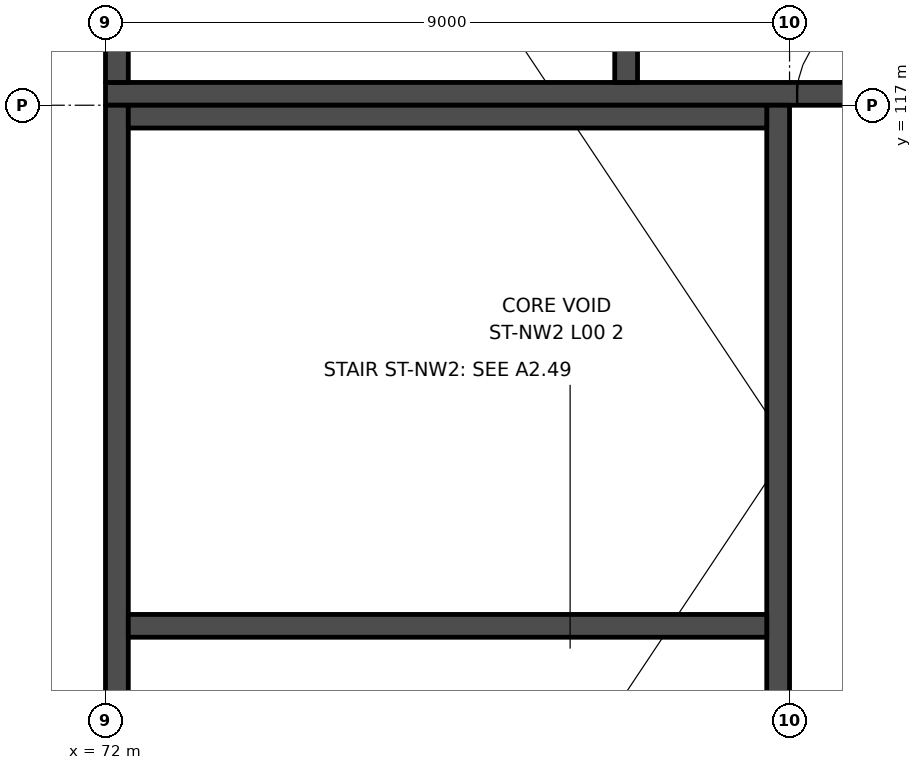
"""IFC4 building model, lengths in metres.
Left out: names, types, materials, properties, quantities, classifications, styles, units other than length and angle.
Written with IfcOpenShell. Run it as: python <this file> out.ifc"""

import sys

from ifc_helpers import new_model, si_unit, direction, frame, frame_2d, origin, place, context, subcontext, project, spatial, rectangle, extrude, element, fill, save


model = new_model("IFC4")
c1 = context("Model", 3, precision=1e-05, world=origin(), true_north=direction((0.0, 1.0)))
c2 = subcontext(c1, "Body", "Model", "MODEL_VIEW")
j1 = project(units=[si_unit("LENGTHUNIT", "METRE"), si_unit("PLANEANGLEUNIT", "RADIAN")], contexts=[c1])
p1 = place(None, origin())
s1 = spatial("IfcSite", under=j1, at=p1, CompositionType="ELEMENT")
p2 = place(p1, origin())
s2 = spatial("IfcBuilding", under=s1, at=p2, CompositionType="ELEMENT")
p3 = place(p2, origin())
s3 = spatial("IfcBuildingStorey", under=s2, at=p3, CompositionType="ELEMENT", Elevation=0.0)
p4 = place(p3, frame((90.25, 117.15, 0.0), z_axis=(0.0, 0.0, 1.0), x_axis=(-1.0, 0.0, 0.0)))
e1 = element("IfcWall", 1, at=p4, inside=s3, PredefinedType="SHEAR", context=c2, shape_type="SweptSolid", body=[
    extrude(rectangle(XDim=18.25, YDim=0.3, at=frame_2d((9.125, 0.0))), origin(), (0.0, 0.0, 1.0), 7.0),
])
p5 = place(p4, frame((8.15, 0.0, 0.0)))
e2 = element("IfcOpeningElement", 2, at=p5, cuts=e1, PredefinedType="OPENING", context=c2, shape_type="SweptSolid", body=[
    extrude(rectangle(XDim=1.0, YDim=2.1, at=frame_2d((0.5, 1.05))), frame((0.0, 0.16, 0.0), z_axis=(0.0, -1.0, 0.0), x_axis=(1.0, 0.0, 0.0)), (0.0, 0.0, 1.0), 0.32),
])
for number, where, z_axis, x_axis in (
    (3, (72.15, 117.3, 0.0), (0.0, 0.0, 1.0), (0.0, 1.0, 0.0)),
    (4, (78.85, 117.3, 0.0), (0.0, 0.0, 1.0), (0.0, 1.0, 0.0)),
):
    element("IfcWall", number, at=place(p3, frame(where, z_axis=z_axis, x_axis=x_axis)), inside=s3, PredefinedType="SHEAR", context=c2, shape_type="SweptSolid", body=[
        extrude(rectangle(XDim=8.4, YDim=0.3, at=frame_2d((4.2, 0.0))), origin(), (0.0, 0.0, 1.0), 7.0),
    ])
p6 = place(p3, frame((80.85, 99.0, 0.0), z_axis=(0.0, 0.0, 1.0), x_axis=(0.0, 1.0, 0.0)))
e5 = element("IfcWall", 5, at=p6, inside=s3, PredefinedType="SHEAR", context=c2, shape_type="SweptSolid", body=[
    extrude(rectangle(XDim=18.0, YDim=0.3, at=frame_2d((9.0, 0.0))), origin(), (0.0, 0.0, 1.0), 7.0),
])
p7 = place(p6, frame((8.6, 0.0, 0.0)))
e6 = element("IfcOpeningElement", 6, at=p7, cuts=e5, PredefinedType="OPENING", context=c2, shape_type="SweptSolid", body=[
    extrude(rectangle(XDim=1.2, YDim=2.1, at=frame_2d((0.6, 1.05))), frame((0.0, 0.16, 0.0), z_axis=(0.0, -1.0, 0.0), x_axis=(1.0, 0.0, 0.0)), (0.0, 0.0, 1.0), 0.32),
])
p8 = place(p3, frame((72.15, 99.0, 0.0), z_axis=(0.0, 0.0, 1.0), x_axis=(0.0, 1.0, 0.0)))
e7 = element("IfcWall", 7, at=p8, inside=s3, PredefinedType="SHEAR", context=c2, shape_type="SweptSolid", body=[
    extrude(rectangle(XDim=18.0, YDim=0.3, at=frame_2d((9.0, 0.0))), origin(), (0.0, 0.0, 1.0), 7.0),
])
for number, where, z_axis, x_axis in (
    (8, (80.7, 116.85, 0.0), (0.0, 0.0, 1.0), (-1.0, 0.0, 0.0)),
    (9, (80.7, 110.15, 0.0), (0.0, 0.0, 1.0), (-1.0, 0.0, 0.0)),
):
    element("IfcWall", number, at=place(p3, frame(where, z_axis=z_axis, x_axis=x_axis)), inside=s3, PredefinedType="SHEAR", context=c2, shape_type="SweptSolid", body=[
        extrude(rectangle(XDim=8.4, YDim=0.3, at=frame_2d((4.2, 0.0))), origin(), (0.0, 0.0, 1.0), 7.0),
    ])
p9 = place(p5, frame((1.0, 0.0, 0.0), z_axis=(0.0, 0.0, 1.0), x_axis=(-1.0, 0.0, 0.0)))
e10 = element("IfcDoor", 10, at=p9, inside=s3, OperationType="SINGLE_SWING_RIGHT", PredefinedType="DOOR", context=c2, shape_type="SweptSolid", body=[
    extrude(rectangle(XDim=1.0, YDim=2.1, at=frame_2d((0.5, 1.05))), frame((0.0, 0.025, 0.0), z_axis=(0.0, -1.0, 0.0), x_axis=(1.0, 0.0, 0.0)), (0.0, 0.0, 1.0), 0.05),
])
fill(e2, e10)
save(model, sys.argv[1])
